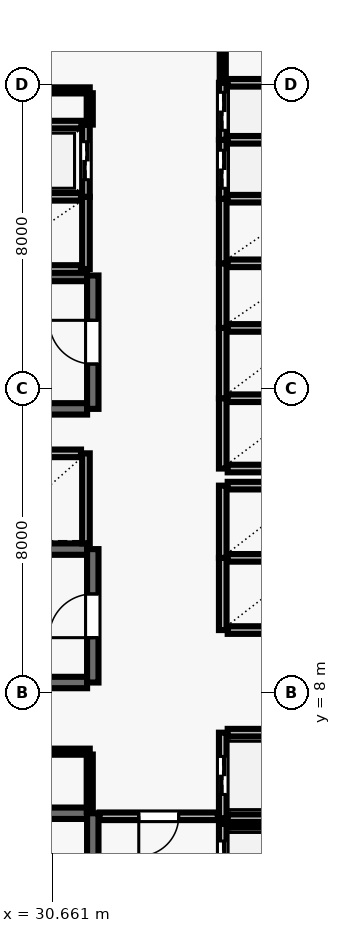
"""IFC4 building model, lengths in metres.
Left out: names, types, materials, properties, quantities, classifications, styles, units other than length and angle.
Written with IfcOpenShell. Run it as: python <this file> out.ifc"""

import sys

from ifc_helpers import new_model, si_unit, direction, frame, frame_2d, origin, place, context, subcontext, project, spatial, rectangle, extrude, element, fill, save


model = new_model("IFC4")
c1 = context("Model", 3, precision=1e-05, world=origin(), true_north=direction((0.0, 1.0)))
c2 = subcontext(c1, "Body", "Model", "MODEL_VIEW")
j1 = project(units=[si_unit("LENGTHUNIT", "METRE"), si_unit("PLANEANGLEUNIT", "RADIAN")], contexts=[c1])
p1 = place(None, origin())
s1 = spatial("IfcSite", under=j1, at=p1, CompositionType="ELEMENT")
p2 = place(p1, origin())
s2 = spatial("IfcBuilding", under=s1, at=p2, CompositionType="ELEMENT")
p3 = place(p2, frame((0.0, 0.0, 20.8)))
s3 = spatial("IfcBuildingStorey", under=s2, at=p3, CompositionType="ELEMENT", Elevation=20.8)
p4 = place(p3, frame((31.58, 4.83, 0.0), z_axis=(0.0, 0.0, 1.0), x_axis=(-1.0, 0.0, 0.0)))
e1 = element("IfcWall", 1, at=p4, inside=s3, PredefinedType="SHEAR", context=c2, shape_type="SweptSolid", body=[
    extrude(rectangle(XDim=8.36, YDim=0.3, at=frame_2d((4.18, 0.0))), origin(), (0.0, 0.0, 1.0), 4.78),
])
p5 = place(p3, frame((31.73, 0.96, 0.0), z_axis=(0.0, 0.0, 1.0), x_axis=(0.0, 1.0, 0.0)))
e2 = element("IfcWall", 2, at=p5, inside=s3, PredefinedType="SHEAR", context=c2, shape_type="SweptSolid", body=[
    extrude(rectangle(XDim=3.87, YDim=0.3, at=frame_2d((1.935, 0.0))), origin(), (0.0, 0.0, 1.0), 4.78),
])
p6 = place(p5, frame((1.54, 0.0, 0.0)))
e3 = element("IfcOpeningElement", 3, at=p6, cuts=e2, PredefinedType="OPENING", context=c2, shape_type="SweptSolid", body=[
    extrude(rectangle(XDim=1.15, YDim=2.15, at=frame_2d((0.575, 1.075))), frame((0.0, 0.16, 0.0), z_axis=(0.0, -1.0, 0.0), x_axis=(1.0, 0.0, 0.0)), (0.0, 0.0, 1.0), 0.32),
])
for number, where, z_axis, x_axis in (
    (4, (31.58, 18.98, 0.0), (0.0, 0.0, 1.0), (-1.0, 0.0, 0.0)),
    (5, (23.22, 15.47, 0.0), (0.0, 0.0, 1.0), (1.0, 0.0, 0.0)),
):
    element("IfcWall", number, at=place(p3, frame(where, z_axis=z_axis, x_axis=x_axis)), inside=s3, PredefinedType="SHEAR", context=c2, shape_type="SweptSolid", body=[
        extrude(rectangle(XDim=8.36, YDim=0.3, at=frame_2d((4.18, 0.0))), origin(), (0.0, 0.0, 1.0), 4.78),
    ])
p7 = place(p3, frame((31.73, 15.47, 0.0), z_axis=(0.0, 0.0, 1.0), x_axis=(0.0, 1.0, 0.0)))
e6 = element("IfcWall", 6, at=p7, inside=s3, PredefinedType="SHEAR", context=c2, shape_type="SweptSolid", body=[
    extrude(rectangle(XDim=3.51, YDim=0.3, at=frame_2d((1.755, 0.0))), origin(), (0.0, 0.0, 1.0), 4.78),
])
p8 = place(p7, frame((1.18, 0.0, 0.0)))
e7 = element("IfcOpeningElement", 7, at=p8, cuts=e6, PredefinedType="OPENING", context=c2, shape_type="SweptSolid", body=[
    extrude(rectangle(XDim=1.15, YDim=2.15, at=frame_2d((0.575, 1.075))), frame((0.0, 0.16, 0.0), z_axis=(0.0, -1.0, 0.0), x_axis=(1.0, 0.0, 0.0)), (0.0, 0.0, 1.0), 0.32),
])
for number, where, z_axis, x_axis in (
    (8, (31.58, 11.78, 0.0), (0.0, 0.0, 1.0), (-1.0, 0.0, 0.0)),
    (9, (23.22, 8.27, 0.0), (0.0, 0.0, 1.0), (1.0, 0.0, 0.0)),
):
    element("IfcWall", number, at=place(p3, frame(where, z_axis=z_axis, x_axis=x_axis)), inside=s3, PredefinedType="SHEAR", context=c2, shape_type="SweptSolid", body=[
        extrude(rectangle(XDim=8.36, YDim=0.3, at=frame_2d((4.18, 0.0))), origin(), (0.0, 0.0, 1.0), 4.78),
    ])
p9 = place(p3, frame((31.73, 8.27, 0.0), z_axis=(0.0, 0.0, 1.0), x_axis=(0.0, 1.0, 0.0)))
e10 = element("IfcWall", 10, at=p9, inside=s3, PredefinedType="SHEAR", context=c2, shape_type="SweptSolid", body=[
    extrude(rectangle(XDim=3.51, YDim=0.3, at=frame_2d((1.755, 0.0))), origin(), (0.0, 0.0, 1.0), 4.78),
])
p10 = place(p9, frame((1.18, 0.0, 0.0)))
e11 = element("IfcOpeningElement", 11, at=p10, cuts=e10, PredefinedType="OPENING", context=c2, shape_type="SweptSolid", body=[
    extrude(rectangle(XDim=1.15, YDim=2.15, at=frame_2d((0.575, 1.075))), frame((0.0, 0.16, 0.0), z_axis=(0.0, -1.0, 0.0), x_axis=(1.0, 0.0, 0.0)), (0.0, 0.0, 1.0), 0.32),
])
p11 = place(p3, frame((35.15, 4.55, 0.0), z_axis=(0.0, 0.0, 1.0), x_axis=(0.0, -1.0, 0.0)))
e12 = element("IfcWall", 12, at=p11, inside=s3, PredefinedType="SOLIDWALL", context=c2, shape_type="SweptSolid", body=[
    extrude(rectangle(XDim=2.1, YDim=0.2, at=frame_2d((1.05, 0.0))), origin(), (0.0, 0.0, 1.0), 4.78),
])
p12 = place(p11, frame((0.45, 0.0, 0.0)))
e13 = element("IfcOpeningElement", 13, at=p12, cuts=e12, PredefinedType="OPENING", context=c2, shape_type="SweptSolid", body=[
    extrude(rectangle(XDim=1.2, YDim=2.15, at=frame_2d((0.6, 1.075))), frame((0.0, 0.11, 0.0), z_axis=(0.0, -1.0, 0.0), x_axis=(1.0, 0.0, 0.0)), (0.0, 0.0, 1.0), 0.22),
])
p13 = place(p3, frame((37.42, 4.55, 0.0), z_axis=(0.0, 0.0, 1.0), x_axis=(-1.0, 0.0, 0.0)))
e14 = element("IfcWall", 14, at=p13, inside=s3, PredefinedType="SOLIDWALL", context=c2, shape_type="SweptSolid", body=[
    extrude(rectangle(XDim=2.14, YDim=0.2, at=frame_2d((1.07, 0.0))), origin(), (0.0, 0.0, 1.0), 4.78),
])
p14 = place(p3, frame((35.15, 6.95, 0.0), z_axis=(0.0, 0.0, 1.0), x_axis=(0.0, -1.0, 0.0)))
e15 = element("IfcWall", 15, at=p14, inside=s3, PredefinedType="SOLIDWALL", context=c2, shape_type="SweptSolid", body=[
    extrude(rectangle(XDim=2.25, YDim=0.2, at=frame_2d((1.125, 0.0))), origin(), (0.0, 0.0, 1.0), 4.78),
])
p15 = place(p14, frame((0.625, 0.0, 0.0)))
e16 = element("IfcOpeningElement", 16, at=p15, cuts=e15, PredefinedType="OPENING", context=c2, shape_type="SweptSolid", body=[
    extrude(rectangle(XDim=1.0, YDim=2.1, at=frame_2d((0.5, 1.05))), frame((0.0, 0.11, 0.0), z_axis=(0.0, -1.0, 0.0), x_axis=(1.0, 0.0, 0.0)), (0.0, 0.0, 1.0), 0.22),
])
for number, where, z_axis, x_axis in (
    (17, (35.28, 4.7, 0.0), (0.0, 0.0, 1.0), (1.0, 0.0, 0.0)),
    (18, (37.42, 6.95, 0.0), (0.0, 0.0, 1.0), (-1.0, 0.0, 0.0)),
):
    element("IfcWall", number, at=place(p3, frame(where, z_axis=z_axis, x_axis=x_axis)), inside=s3, PredefinedType="SOLIDWALL", context=c2, shape_type="SweptSolid", body=[
        extrude(rectangle(XDim=2.14, YDim=0.2, at=frame_2d((1.07, 0.0))), origin(), (0.0, 0.0, 1.0), 4.78),
    ])
p16 = place(p3, frame((35.15, 11.55, 0.0), z_axis=(0.0, 0.0, 1.0), x_axis=(0.0, -1.0, 0.0)))
e19 = element("IfcWall", 19, at=p16, inside=s3, PredefinedType="SOLIDWALL", context=c2, shape_type="SweptSolid", body=[
    extrude(rectangle(XDim=1.9, YDim=0.2, at=frame_2d((0.95, 0.0))), origin(), (0.0, 0.0, 1.0), 4.78),
])
for number, where, z_axis, x_axis in (
    (20, (35.28, 9.65, 0.0), (0.0, 0.0, 1.0), (1.0, 0.0, 0.0)),
    (21, (37.42, 11.55, 0.0), (0.0, 0.0, 1.0), (-1.0, 0.0, 0.0)),
):
    element("IfcWall", number, at=place(p3, frame(where, z_axis=z_axis, x_axis=x_axis)), inside=s3, PredefinedType="SOLIDWALL", context=c2, shape_type="SweptSolid", body=[
        extrude(rectangle(XDim=2.14, YDim=0.2, at=frame_2d((1.07, 0.0))), origin(), (0.0, 0.0, 1.0), 4.78),
    ])
p17 = place(p3, frame((35.15, 13.45, 0.0), z_axis=(0.0, 0.0, 1.0), x_axis=(0.0, -1.0, 0.0)))
e22 = element("IfcWall", 22, at=p17, inside=s3, PredefinedType="SOLIDWALL", context=c2, shape_type="SweptSolid", body=[
    extrude(rectangle(XDim=1.9, YDim=0.2, at=frame_2d((0.95, 0.0))), origin(), (0.0, 0.0, 1.0), 4.78),
])
p18 = place(p3, frame((37.42, 13.45, 0.0), z_axis=(0.0, 0.0, 1.0), x_axis=(-1.0, 0.0, 0.0)))
e23 = element("IfcWall", 23, at=p18, inside=s3, PredefinedType="SOLIDWALL", context=c2, shape_type="SweptSolid", body=[
    extrude(rectangle(XDim=2.14, YDim=0.2, at=frame_2d((1.07, 0.0))), origin(), (0.0, 0.0, 1.0), 4.78),
])
p19 = place(p3, frame((31.55, 11.93, 0.0), z_axis=(0.0, 0.0, 1.0), x_axis=(0.0, 1.0, 0.0)))
e24 = element("IfcWall", 24, at=p19, inside=s3, PredefinedType="SOLIDWALL", context=c2, shape_type="SweptSolid", body=[
    extrude(rectangle(XDim=2.37, YDim=0.2, at=frame_2d((1.185, 0.0))), origin(), (0.0, 0.0, 1.0), 4.78),
])
p20 = place(p3, frame((31.42, 14.3, 0.0), z_axis=(0.0, 0.0, 1.0), x_axis=(-1.0, 0.0, 0.0)))
e25 = element("IfcWall", 25, at=p20, inside=s3, PredefinedType="SOLIDWALL", context=c2, shape_type="SweptSolid", body=[
    extrude(rectangle(XDim=2.44, YDim=0.2, at=frame_2d((1.22, 0.0))), origin(), (0.0, 0.0, 1.0), 4.78),
])
p21 = place(p3, frame((35.15, 15.75, 0.0), z_axis=(0.0, 0.0, 1.0), x_axis=(0.0, -1.0, 0.0)))
e26 = element("IfcWall", 26, at=p21, inside=s3, PredefinedType="SOLIDWALL", context=c2, shape_type="SweptSolid", body=[
    extrude(rectangle(XDim=1.85, YDim=0.2, at=frame_2d((0.925, 0.0))), origin(), (0.0, 0.0, 1.0), 4.78),
])
for number, where, z_axis, x_axis in (
    (27, (35.28, 13.9, 0.0), (0.0, 0.0, 1.0), (1.0, 0.0, 0.0)),
    (28, (37.42, 15.75, 0.0), (0.0, 0.0, 1.0), (-1.0, 0.0, 0.0)),
):
    element("IfcWall", number, at=place(p3, frame(where, z_axis=z_axis, x_axis=x_axis)), inside=s3, PredefinedType="SOLIDWALL", context=c2, shape_type="SweptSolid", body=[
        extrude(rectangle(XDim=2.14, YDim=0.2, at=frame_2d((1.07, 0.0))), origin(), (0.0, 0.0, 1.0), 4.78),
    ])
p22 = place(p3, frame((35.15, 17.6, 0.0), z_axis=(0.0, 0.0, 1.0), x_axis=(0.0, -1.0, 0.0)))
e29 = element("IfcWall", 29, at=p22, inside=s3, PredefinedType="SOLIDWALL", context=c2, shape_type="SweptSolid", body=[
    extrude(rectangle(XDim=1.85, YDim=0.2, at=frame_2d((0.925, 0.0))), origin(), (0.0, 0.0, 1.0), 4.78),
])
p23 = place(p3, frame((37.42, 17.6, 0.0), z_axis=(0.0, 0.0, 1.0), x_axis=(-1.0, 0.0, 0.0)))
e30 = element("IfcWall", 30, at=p23, inside=s3, PredefinedType="SOLIDWALL", context=c2, shape_type="SweptSolid", body=[
    extrude(rectangle(XDim=2.14, YDim=0.2, at=frame_2d((1.07, 0.0))), origin(), (0.0, 0.0, 1.0), 4.78),
])
p24 = place(p3, frame((35.15, 19.3, 0.0), z_axis=(0.0, 0.0, 1.0), x_axis=(0.0, -1.0, 0.0)))
e31 = element("IfcWall", 31, at=p24, inside=s3, PredefinedType="SOLIDWALL", context=c2, shape_type="SweptSolid", body=[
    extrude(rectangle(XDim=1.7, YDim=0.2, at=frame_2d((0.85, 0.0))), origin(), (0.0, 0.0, 1.0), 4.78),
])
p25 = place(p3, frame((37.42, 19.3, 0.0), z_axis=(0.0, 0.0, 1.0), x_axis=(-1.0, 0.0, 0.0)))
e32 = element("IfcWall", 32, at=p25, inside=s3, PredefinedType="SOLIDWALL", context=c2, shape_type="SweptSolid", body=[
    extrude(rectangle(XDim=2.14, YDim=0.2, at=frame_2d((1.07, 0.0))), origin(), (0.0, 0.0, 1.0), 4.78),
])
p26 = place(p3, frame((35.15, 21.0, 0.0), z_axis=(0.0, 0.0, 1.0), x_axis=(0.0, -1.0, 0.0)))
e33 = element("IfcWall", 33, at=p26, inside=s3, PredefinedType="SOLIDWALL", context=c2, shape_type="SweptSolid", body=[
    extrude(rectangle(XDim=1.7, YDim=0.2, at=frame_2d((0.85, 0.0))), origin(), (0.0, 0.0, 1.0), 4.78),
])
p27 = place(p3, frame((37.42, 21.0, 0.0), z_axis=(0.0, 0.0, 1.0), x_axis=(-1.0, 0.0, 0.0)))
e34 = element("IfcWall", 34, at=p27, inside=s3, PredefinedType="SOLIDWALL", context=c2, shape_type="SweptSolid", body=[
    extrude(rectangle(XDim=2.14, YDim=0.2, at=frame_2d((1.07, 0.0))), origin(), (0.0, 0.0, 1.0), 4.78),
])
p28 = place(p3, frame((31.55, 19.15, 0.0), z_axis=(0.0, 0.0, 1.0), x_axis=(0.0, 1.0, 0.0)))
e35 = element("IfcWall", 35, at=p28, inside=s3, PredefinedType="SOLIDWALL", context=c2, shape_type="SweptSolid", body=[
    extrude(rectangle(XDim=1.9, YDim=0.2, at=frame_2d((0.95, 0.0))), origin(), (0.0, 0.0, 1.0), 4.78),
])
for number, where, z_axis, x_axis in (
    (36, (28.98, 19.15, 0.0), (0.0, 0.0, 1.0), (1.0, 0.0, 0.0)),
    (37, (31.42, 21.05, 0.0), (0.0, 0.0, 1.0), (-1.0, 0.0, 0.0)),
):
    element("IfcWall", number, at=place(p3, frame(where, z_axis=z_axis, x_axis=x_axis)), inside=s3, PredefinedType="SOLIDWALL", context=c2, shape_type="SweptSolid", body=[
        extrude(rectangle(XDim=2.44, YDim=0.2, at=frame_2d((1.22, 0.0))), origin(), (0.0, 0.0, 1.0), 4.78),
    ])
p29 = place(p3, frame((35.15, 22.55, 0.0), z_axis=(0.0, 0.0, 1.0), x_axis=(0.0, -1.0, 0.0)))
e38 = element("IfcWall", 38, at=p29, inside=s3, PredefinedType="SOLIDWALL", context=c2, shape_type="SweptSolid", body=[
    extrude(rectangle(XDim=1.55, YDim=0.2, at=frame_2d((0.775, 0.0))), origin(), (0.0, 0.0, 1.0), 4.78),
])
p30 = place(p29, frame((0.275, 0.0, 0.0)))
e39 = element("IfcOpeningElement", 39, at=p30, cuts=e38, PredefinedType="OPENING", context=c2, shape_type="SweptSolid", body=[
    extrude(rectangle(XDim=1.0, YDim=2.1, at=frame_2d((0.5, 1.05))), frame((0.0, 0.11, 0.0), z_axis=(0.0, -1.0, 0.0), x_axis=(1.0, 0.0, 0.0)), (0.0, 0.0, 1.0), 0.22),
])
p31 = place(p3, frame((37.42, 22.55, 0.0), z_axis=(0.0, 0.0, 1.0), x_axis=(-1.0, 0.0, 0.0)))
e40 = element("IfcWall", 40, at=p31, inside=s3, PredefinedType="SOLIDWALL", context=c2, shape_type="SweptSolid", body=[
    extrude(rectangle(XDim=2.14, YDim=0.2, at=frame_2d((1.07, 0.0))), origin(), (0.0, 0.0, 1.0), 4.78),
])
p32 = place(p3, frame((35.15, 24.05, 0.0), z_axis=(0.0, 0.0, 1.0), x_axis=(0.0, -1.0, 0.0)))
e41 = element("IfcWall", 41, at=p32, inside=s3, PredefinedType="SOLIDWALL", context=c2, shape_type="SweptSolid", body=[
    extrude(rectangle(XDim=1.5, YDim=0.2, at=frame_2d((0.75, 0.0))), origin(), (0.0, 0.0, 1.0), 4.78),
])
p33 = place(p32, frame((0.25, 0.0, 0.0)))
e42 = element("IfcOpeningElement", 42, at=p33, cuts=e41, PredefinedType="OPENING", context=c2, shape_type="SweptSolid", body=[
    extrude(rectangle(XDim=1.0, YDim=2.1, at=frame_2d((0.5, 1.05))), frame((0.0, 0.11, 0.0), z_axis=(0.0, -1.0, 0.0), x_axis=(1.0, 0.0, 0.0)), (0.0, 0.0, 1.0), 0.22),
])
p34 = place(p3, frame((37.42, 24.05, 0.0), z_axis=(0.0, 0.0, 1.0), x_axis=(-1.0, 0.0, 0.0)))
e43 = element("IfcWall", 43, at=p34, inside=s3, PredefinedType="SOLIDWALL", context=c2, shape_type="SweptSolid", body=[
    extrude(rectangle(XDim=2.14, YDim=0.2, at=frame_2d((1.07, 0.0))), origin(), (0.0, 0.0, 1.0), 4.78),
])
p35 = place(p3, frame((31.55, 21.05, 0.0), z_axis=(0.0, 0.0, 1.0), x_axis=(0.0, 1.0, 0.0)))
e44 = element("IfcWall", 44, at=p35, inside=s3, PredefinedType="SOLIDWALL", context=c2, shape_type="SweptSolid", body=[
    extrude(rectangle(XDim=1.9, YDim=0.2, at=frame_2d((0.95, 0.0))), origin(), (0.0, 0.0, 1.0), 4.78),
])
p36 = place(p35, frame((0.45, 0.0, 0.0)))
e45 = element("IfcOpeningElement", 45, at=p36, cuts=e44, PredefinedType="OPENING", context=c2, shape_type="SweptSolid", body=[
    extrude(rectangle(XDim=1.0, YDim=2.1, at=frame_2d((0.5, 1.05))), frame((0.0, 0.11, 0.0), z_axis=(0.0, -1.0, 0.0), x_axis=(1.0, 0.0, 0.0)), (0.0, 0.0, 1.0), 0.22),
])
p37 = place(p3, frame((31.43, 22.95, 0.0), z_axis=(0.0, 0.0, 1.0), x_axis=(-1.0, 0.0, 0.0)))
e46 = element("IfcWall", 46, at=p37, inside=s3, PredefinedType="SOLIDWALL", context=c2, shape_type="SweptSolid", body=[
    extrude(rectangle(XDim=2.46, YDim=0.2, at=frame_2d((1.23, 0.0))), origin(), (0.0, 0.0, 1.0), 4.78),
])
p38 = place(p3, frame((28.55, 6.45, 0.0), z_axis=(0.0, 0.0, 1.0), x_axis=(1.0, 0.0, 0.0)))
e47 = element("IfcWall", 47, at=p38, inside=s3, PredefinedType="PARTITIONING", context=c2, shape_type="SweptSolid", body=[
    extrude(rectangle(XDim=3.1, YDim=0.16, at=frame_2d((1.55, 0.0))), origin(), (0.0, 0.0, 1.0), 4.78),
])
p39 = place(p38, frame((1.11, 0.0, 0.0)))
e48 = element("IfcOpeningElement", 48, at=p39, cuts=e47, PredefinedType="OPENING", context=c2, shape_type="SweptSolid", body=[
    extrude(rectangle(XDim=0.88, YDim=2.1, at=frame_2d((0.44, 1.05))), frame((0.0, 0.09, 0.0), z_axis=(0.0, -1.0, 0.0), x_axis=(1.0, 0.0, 0.0)), (0.0, 0.0, 1.0), 0.18),
])
p40 = place(p3, frame((28.8, 23.85, 0.0), z_axis=(0.0, 0.0, 1.0), x_axis=(1.0, 0.0, 0.0)))
e49 = element("IfcWall", 49, at=p40, inside=s3, PredefinedType="PARTITIONING", context=c2, shape_type="SweptSolid", body=[
    extrude(rectangle(XDim=2.85, YDim=0.16, at=frame_2d((1.425, 0.0))), origin(), (0.0, 0.0, 1.0), 4.78),
])
p41 = place(p3, frame((35.02, 4.75, 0.0), z_axis=(0.0, 0.0, 1.0), x_axis=(-1.0, 0.0, 0.0)))
e50 = element("IfcWall", 50, at=p41, inside=s3, PredefinedType="SOLIDWALL", context=c2, shape_type="SweptSolid", body=[
    extrude(rectangle(XDim=3.11, YDim=0.2, at=frame_2d((1.555, 0.0))), origin(), (0.0, 0.0, 1.0), 4.78),
])
p42 = place(p41, frame((1.03, 0.0, 0.0)))
e51 = element("IfcOpeningElement", 51, at=p42, cuts=e50, PredefinedType="OPENING", context=c2, shape_type="SweptSolid", body=[
    extrude(rectangle(XDim=1.05, YDim=2.15, at=frame_2d((0.525, 1.075))), frame((0.0, 0.11, 0.0), z_axis=(0.0, -1.0, 0.0), x_axis=(1.0, 0.0, 0.0)), (0.0, 0.0, 1.0), 0.22),
])
p43 = place(p3, frame((31.65, 4.86, 0.0), z_axis=(0.0, 0.0, 1.0), x_axis=(0.0, 1.0, 0.0)))
e52 = element("IfcWall", 52, at=p43, inside=s3, PredefinedType="PARTITIONING", context=c2, shape_type="SweptSolid", body=[
    extrude(rectangle(XDim=1.515, YDim=0.16, at=frame_2d((0.757, 0.0))), origin(), (0.0, 0.0, 1.0), 4.78),
])
p44 = place(p3, frame((31.65, 23.775, 0.0), z_axis=(0.0, 0.0, 1.0), x_axis=(0.0, -1.0, 0.0)))
e53 = element("IfcWall", 53, at=p44, inside=s3, PredefinedType="PARTITIONING", context=c2, shape_type="SweptSolid", body=[
    extrude(rectangle(XDim=0.825, YDim=0.16, at=frame_2d((0.413, 0.0))), origin(), (0.0, 0.0, 1.0), 4.78),
])
p45 = place(p3, frame((35.15, 24.07, 0.0), z_axis=(0.0, 0.0, 1.0), x_axis=(0.0, 1.0, 0.0)))
e54 = element("IfcWall", 54, at=p45, inside=s3, PredefinedType="PARTITIONING", context=c2, shape_type="SweptSolid", body=[
    extrude(rectangle(XDim=1.855, YDim=0.16, at=frame_2d((0.927, 0.0))), origin(), (0.0, 0.0, 1.0), 4.78),
])
p46 = place(p8, origin())
e55 = element("IfcDoor", 55, at=p46, inside=s3, OperationType="SINGLE_SWING_RIGHT", PredefinedType="DOOR", context=c2, shape_type="SweptSolid", body=[
    extrude(rectangle(XDim=1.15, YDim=2.15, at=frame_2d((0.575, 1.075))), frame((0.0, 0.025, 0.0), z_axis=(0.0, -1.0, 0.0), x_axis=(1.0, 0.0, 0.0)), (0.0, 0.0, 1.0), 0.05),
])
fill(e7, e55)
p47 = place(p10, origin())
e56 = element("IfcDoor", 56, at=p47, inside=s3, OperationType="SINGLE_SWING_LEFT", PredefinedType="DOOR", context=c2, shape_type="SweptSolid", body=[
    extrude(rectangle(XDim=1.15, YDim=2.15, at=frame_2d((0.575, 1.075))), frame((0.0, 0.025, 0.0), z_axis=(0.0, -1.0, 0.0), x_axis=(1.0, 0.0, 0.0)), (0.0, 0.0, 1.0), 0.05),
])
fill(e11, e56)
p48 = place(p12, origin())
e57 = element("IfcDoor", 57, at=p48, inside=s3, OperationType="DOUBLE_DOOR_SLIDING", PredefinedType="DOOR", context=c2, shape_type="SweptSolid", body=[
    extrude(rectangle(XDim=1.2, YDim=2.15, at=frame_2d((0.6, 1.075))), frame((0.0, 0.025, 0.0), z_axis=(0.0, -1.0, 0.0), x_axis=(1.0, 0.0, 0.0)), (0.0, 0.0, 1.0), 0.05),
])
fill(e13, e57)
p49 = place(p15, origin())
e58 = element("IfcDoor", 58, at=p49, inside=s3, OperationType="DOUBLE_DOOR_SLIDING", PredefinedType="DOOR", context=c2, shape_type="SweptSolid", body=[
    extrude(rectangle(XDim=1.0, YDim=2.1, at=frame_2d((0.5, 1.05))), frame((0.0, 0.025, 0.0), z_axis=(0.0, -1.0, 0.0), x_axis=(1.0, 0.0, 0.0)), (0.0, 0.0, 1.0), 0.05),
])
fill(e16, e58)
p50 = place(p30, origin())
e59 = element("IfcDoor", 59, at=p50, inside=s3, OperationType="DOUBLE_DOOR_SLIDING", PredefinedType="DOOR", context=c2, shape_type="SweptSolid", body=[
    extrude(rectangle(XDim=1.0, YDim=2.1, at=frame_2d((0.5, 1.05))), frame((0.0, 0.025, 0.0), z_axis=(0.0, -1.0, 0.0), x_axis=(1.0, 0.0, 0.0)), (0.0, 0.0, 1.0), 0.05),
])
fill(e39, e59)
p51 = place(p33, origin())
e60 = element("IfcDoor", 60, at=p51, inside=s3, OperationType="DOUBLE_DOOR_SLIDING", PredefinedType="DOOR", context=c2, shape_type="SweptSolid", body=[
    extrude(rectangle(XDim=1.0, YDim=2.1, at=frame_2d((0.5, 1.05))), frame((0.0, 0.025, 0.0), z_axis=(0.0, -1.0, 0.0), x_axis=(1.0, 0.0, 0.0)), (0.0, 0.0, 1.0), 0.05),
])
fill(e42, e60)
p52 = place(p36, origin())
e61 = element("IfcDoor", 61, at=p52, inside=s3, OperationType="DOUBLE_DOOR_SLIDING", PredefinedType="DOOR", context=c2, shape_type="SweptSolid", body=[
    extrude(rectangle(XDim=1.0, YDim=2.1, at=frame_2d((0.5, 1.05))), frame((0.0, 0.025, 0.0), z_axis=(0.0, -1.0, 0.0), x_axis=(1.0, 0.0, 0.0)), (0.0, 0.0, 1.0), 0.05),
])
fill(e45, e61)
p53 = place(p42, origin())
e62 = element("IfcDoor", 62, at=p53, inside=s3, OperationType="SINGLE_SWING_RIGHT", PredefinedType="DOOR", context=c2, shape_type="SweptSolid", body=[
    extrude(rectangle(XDim=1.05, YDim=2.15, at=frame_2d((0.525, 1.075))), frame((0.0, 0.025, 0.0), z_axis=(0.0, -1.0, 0.0), x_axis=(1.0, 0.0, 0.0)), (0.0, 0.0, 1.0), 0.05),
])
fill(e51, e62)
save(model, sys.argv[1])
